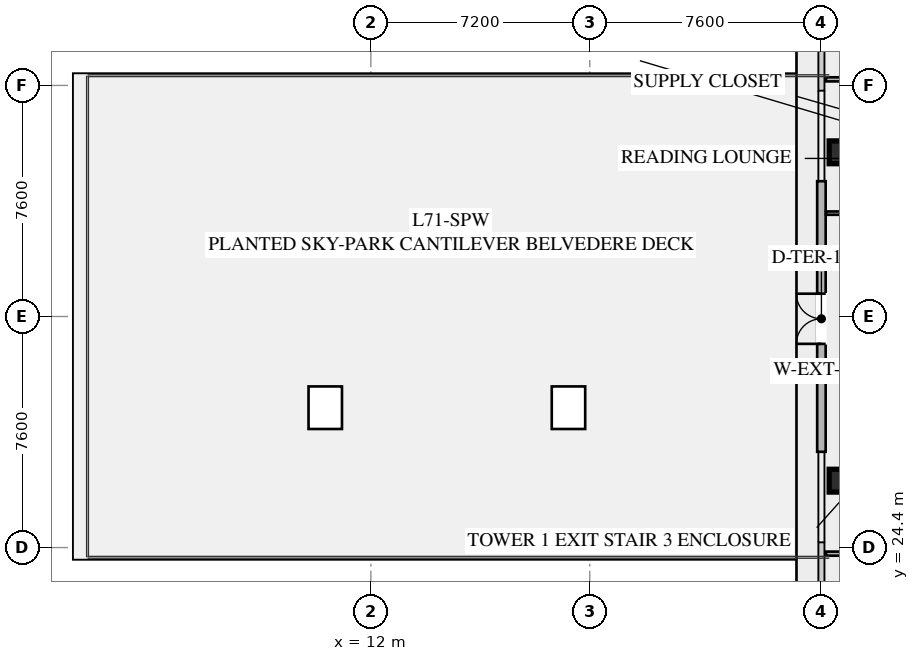
"""IFC4 building model, lengths in metres.
Left out: names, types, materials, properties, quantities, classifications, styles, units other than length and angle.
Written with IfcOpenShell. Run it as: python <this file> out.ifc"""

import sys

from ifc_helpers import new_model, si_unit, direction, frame, frame_2d, origin, origin_2d, place, context, subcontext, project, spatial, rectangle, hollow_rectangle, extrude, element, fill, save


model = new_model("IFC4")
c1 = context("Model", 3, precision=1e-05, world=origin(), true_north=direction((0.0, 1.0)))
c2 = subcontext(c1, "Body", "Model", "MODEL_VIEW")
j1 = project(units=[si_unit("LENGTHUNIT", "METRE"), si_unit("PLANEANGLEUNIT", "RADIAN")], contexts=[c1])
p1 = place(None, origin())
s1 = spatial("IfcSite", under=j1, at=p1, CompositionType="ELEMENT")
p2 = place(p1, origin())
s2 = spatial("IfcBuilding", under=s1, at=p2, CompositionType="ELEMENT")
p3 = place(p2, frame((0.0, 0.0, 263.4)))
s3 = spatial("IfcBuildingStorey", under=s2, at=p3, CompositionType="ELEMENT", Elevation=263.4)
for number, where, z_axis, x_axis in (
    (1, (27.45, 37.4, -0.295), (0.0, 0.0, 1.0), (1.0, 0.0, 0.0)),
    (2, (27.45, 26.6, -0.295), (0.0, 0.0, 1.0), (1.0, 0.0, 0.0)),
):
    element("IfcColumn", number, at=place(p3, frame(where, z_axis=z_axis, x_axis=x_axis)), inside=s3, PredefinedType="COLUMN", context=c2, shape_type="SweptSolid", body=[
        extrude(hollow_rectangle(XDim=0.75, YDim=0.75, WallThickness=0.032, at=origin_2d()), origin(), (0.0, 0.0, 1.0), 3.665),
    ])
p4 = place(p3, frame((26.82, 27.55, 0.0), z_axis=(0.0, 0.0, 1.0), x_axis=(0.0, 1.0, 0.0)))
e3 = element("IfcWall", 3, at=p4, inside=s3, PredefinedType="SOLIDWALL", context=c2, shape_type="SweptSolid", body=[
    extrude(rectangle(XDim=8.9, YDim=0.28, at=frame_2d((4.45, 0.0))), origin(), (0.0, 0.0, 1.0), 3.37),
])
p5 = place(p4, frame((3.55, 0.0, 0.0)))
e4 = element("IfcOpeningElement", 4, at=p5, cuts=e3, PredefinedType="OPENING", context=c2, shape_type="SweptSolid", body=[
    extrude(rectangle(XDim=1.65, YDim=2.2, at=frame_2d((0.825, 1.1))), frame((0.0, 0.15, 0.0), z_axis=(0.0, -1.0, 0.0), x_axis=(1.0, 0.0, 0.0)), (0.0, 0.0, 1.0), 0.3),
])
p6 = place(p3, frame((32.45, 39.8, 0.0), z_axis=(0.0, 0.0, 1.0), x_axis=(-1.0, 0.0, 0.0)))
e5 = element("IfcWall", 5, at=p6, inside=s3, PredefinedType="PARTITIONING", context=c2, shape_type="SweptSolid", body=[
    extrude(rectangle(XDim=5.48, YDim=0.135, at=frame_2d((2.74, 0.0))), origin(), (0.0, 0.0, 1.0), 2.723),
])
p7 = place(p6, frame((2.025, 0.0, 0.0)))
e6 = element("IfcOpeningElement", 6, at=p7, cuts=e5, PredefinedType="OPENING", context=c2, shape_type="SweptSolid", body=[
    extrude(rectangle(XDim=0.95, YDim=2.05, at=frame_2d((0.475, 1.025))), frame((0.0, 0.077, 0.0), z_axis=(0.0, -1.0, 0.0), x_axis=(1.0, 0.0, 0.0)), (0.0, 0.0, 1.0), 0.155),
])
p8 = place(p3, frame((26.97, 24.2, 0.0), z_axis=(0.0, 0.0, 1.0), x_axis=(1.0, 0.0, 0.0)))
e7 = element("IfcWall", 7, at=p8, inside=s3, PredefinedType="PARTITIONING", context=c2, shape_type="SweptSolid", body=[
    extrude(rectangle(XDim=7.15, YDim=0.135, at=frame_2d((3.575, 0.0))), origin(), (0.0, 0.0, 1.0), 2.723),
])
p9 = place(p8, frame((4.155, 0.0, 0.0)))
e8 = element("IfcOpeningElement", 8, at=p9, cuts=e7, PredefinedType="OPENING", context=c2, shape_type="SweptSolid", body=[
    extrude(rectangle(XDim=0.95, YDim=2.05, at=frame_2d((0.475, 1.025))), frame((0.0, 0.077, 0.0), z_axis=(0.0, -1.0, 0.0), x_axis=(1.0, 0.0, 0.0)), (0.0, 0.0, 1.0), 0.155),
])
p10 = place(p3, frame((30.6, 35.4, 0.0), z_axis=(0.0, 0.0, 1.0), x_axis=(-1.0, 0.0, 0.0)))
e9 = element("IfcWall", 9, at=p10, inside=s3, PredefinedType="PARTITIONING", context=c2, shape_type="SweptSolid", body=[
    extrude(rectangle(XDim=3.63, YDim=0.11, at=frame_2d((1.815, 0.0))), origin(), (0.0, 0.0, 1.0), 2.723),
])
p11 = place(p5, origin())
e10 = element("IfcDoor", 10, at=p11, inside=s3, OperationType="DOUBLE_DOOR_SINGLE_SWING", PredefinedType="DOOR", context=c2, shape_type="SweptSolid", body=[
    extrude(rectangle(XDim=1.65, YDim=2.2, at=frame_2d((0.825, 1.1))), frame((0.0, 0.025, 0.0), z_axis=(0.0, -1.0, 0.0), x_axis=(1.0, 0.0, 0.0)), (0.0, 0.0, 1.0), 0.05),
])
fill(e4, e10)
p12 = place(p3, frame((0.0, 0.0, -0.3)))
p13 = place(p12, frame((10.5, 29.0, 0.0)))
p14 = place(p13, frame((0.0, 0.0, 0.25)))
e11 = element("IfcDoor", 11, at=p14, inside=s3, OperationType="SINGLE_SWING_LEFT", PredefinedType="TRAPDOOR", context=c2, shape_type="SweptSolid", body=[
    extrude(rectangle(XDim=1.1, YDim=1.4, at=origin_2d()), origin(), (0.0, 0.0, 1.0), 0.05),
])
p15 = place(p12, frame((18.5, 29.0, 0.0)))
p16 = place(p15, frame((0.0, 0.0, 0.25)))
e12 = element("IfcDoor", 12, at=p16, inside=s3, OperationType="SINGLE_SWING_LEFT", PredefinedType="TRAPDOOR", context=c2, shape_type="SweptSolid", body=[
    extrude(rectangle(XDim=1.1, YDim=1.4, at=origin_2d()), origin(), (0.0, 0.0, 1.0), 0.05),
])
save(model, sys.argv[1])
